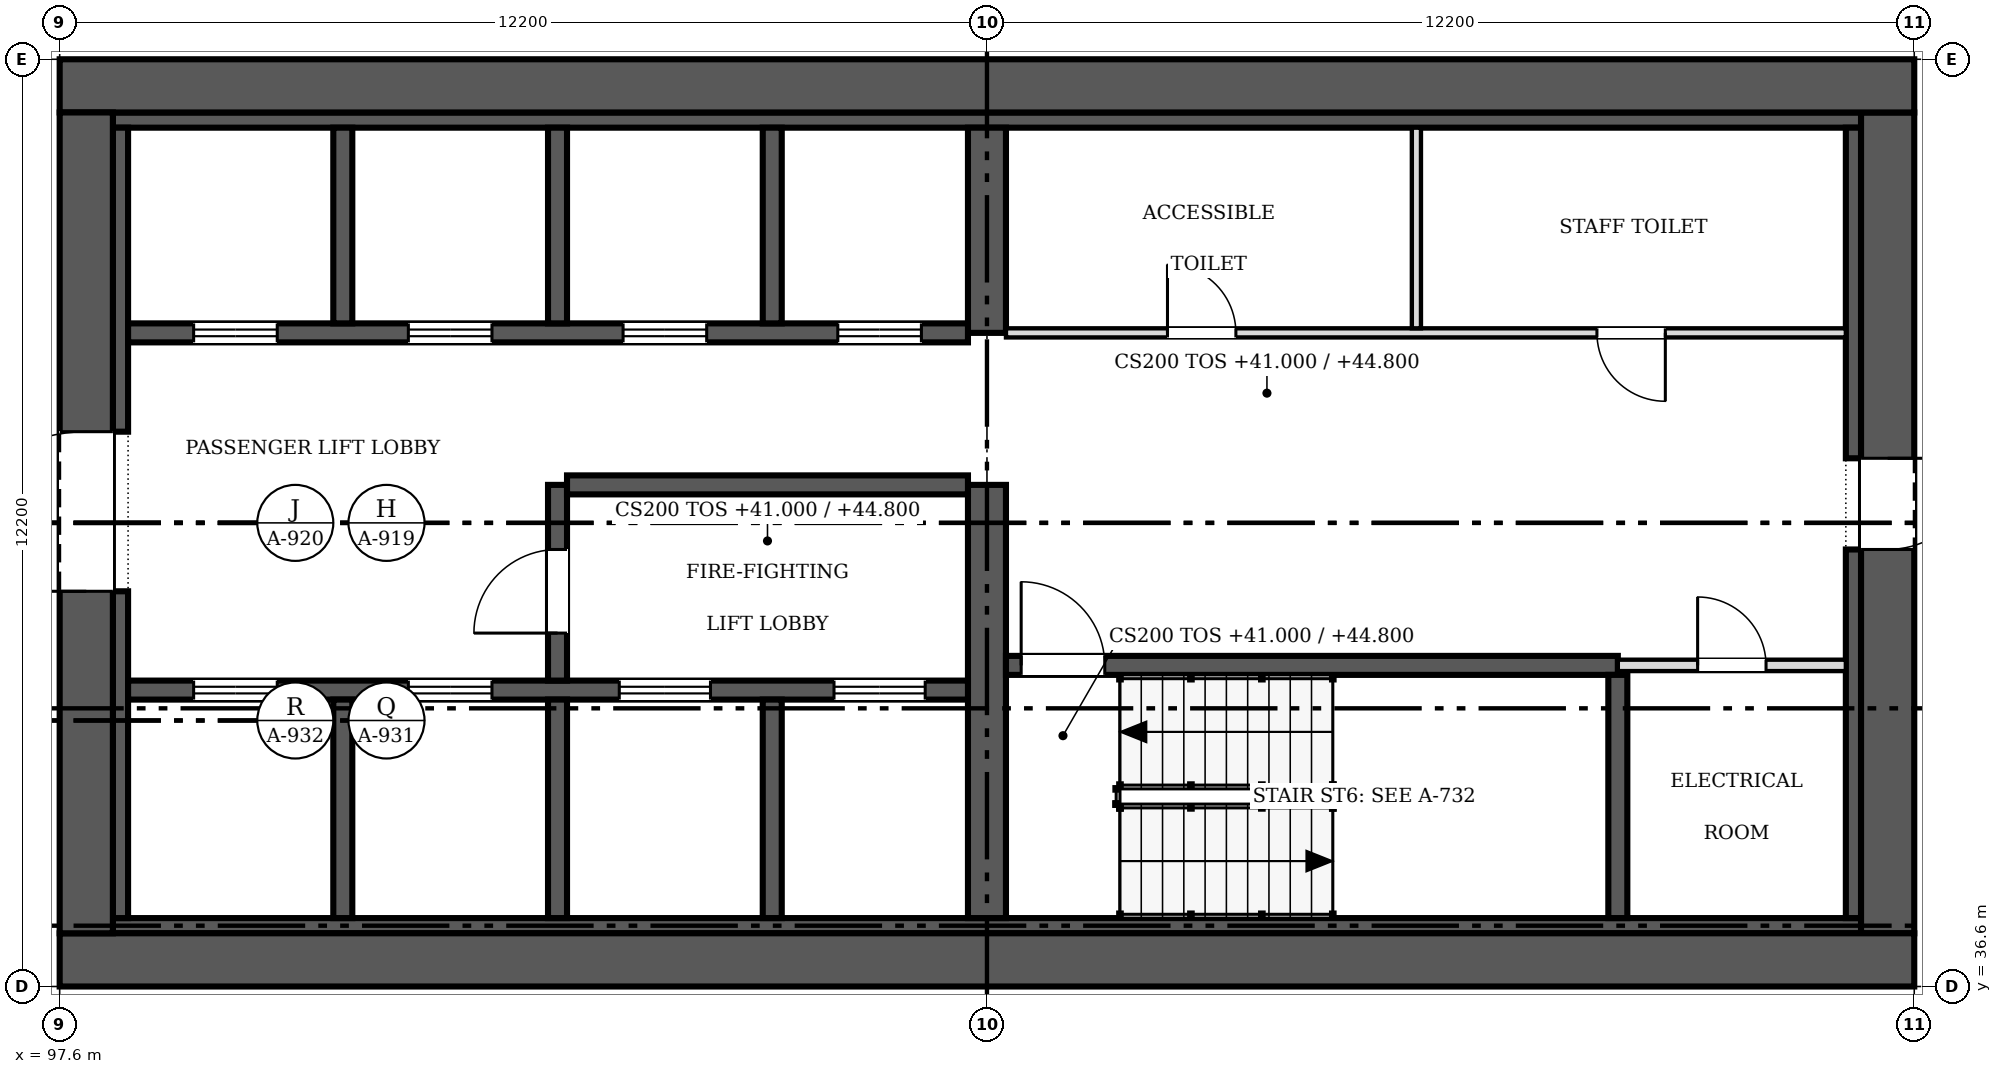
"""IFC4 building model, lengths in metres.
Left out: names, types, materials, properties, quantities, classifications, styles, units other than length and angle.
Written with IfcOpenShell. Run it as: python <this file> out.ifc"""

import sys

from ifc_helpers import new_model, si_unit, direction, frame, frame_2d, origin, place, context, subcontext, project, spatial, rectangle, extrude, source, transform, mapped, element, fill, save


model = new_model("IFC4")
c1 = context("Model", 3, precision=1e-05, world=origin(), true_north=direction((0.0, 1.0)))
c2 = subcontext(c1, "Body", "Model", "MODEL_VIEW")
j1 = project(units=[si_unit("LENGTHUNIT", "METRE"), si_unit("PLANEANGLEUNIT", "RADIAN")], contexts=[c1])
p1 = place(None, origin())
s1 = spatial("IfcSite", under=j1, at=p1, CompositionType="ELEMENT")
p2 = place(p1, origin())
s2 = spatial("IfcBuilding", under=s1, at=p2, CompositionType="ELEMENT")
p3 = place(p2, frame((0.0, 0.0, 41.0)))
s3 = spatial("IfcBuildingStorey", under=s2, at=p3, CompositionType="ELEMENT", Elevation=41.0)
p4 = place(p3, frame((122.0, 36.95, 0.0), z_axis=(0.0, 0.0, 1.0), x_axis=(-1.0, 0.0, 0.0)))
e1 = element("IfcWall", 1, at=p4, inside=s3, PredefinedType="SHEAR", context=c2, shape_type="SweptSolid", body=[
    extrude(rectangle(XDim=24.4, YDim=0.7, at=frame_2d((12.2, 0.0))), origin(), (0.0, 0.0, 1.0), 3.8),
])
p5 = place(p3, frame((97.95, 37.3, 0.0), z_axis=(0.0, 0.0, 1.0), x_axis=(0.0, 1.0, 0.0)))
e2 = element("IfcWall", 2, at=p5, inside=s3, PredefinedType="SHEAR", context=c2, shape_type="SweptSolid", body=[
    extrude(rectangle(XDim=10.8, YDim=0.7, at=frame_2d((5.4, 0.0))), origin(), (0.0, 0.0, 1.0), 3.8),
])
m1 = source(origin(), c2, "Body", "SweptSolid", [
    extrude(rectangle(XDim=2.1, YDim=2.4, at=frame_2d((1.05, 1.2))), frame((0.0, 0.36, 0.0), z_axis=(0.0, -1.0, 0.0), x_axis=(1.0, 0.0, 0.0)), (0.0, 0.0, 1.0), 0.72),
])
p6 = place(p5, frame((4.5, 0.0, 0.0)))
e3 = element("IfcOpeningElement", 3, at=p6, cuts=e2, PredefinedType="OPENING", context=c2, shape_type="MappedRepresentation", body=[
    mapped(m1, transform((0.0, 0.0, 0.0), scale=1.0)),
])
p7 = place(p3, frame((97.6, 48.45, 0.0), z_axis=(0.0, 0.0, 1.0), x_axis=(1.0, 0.0, 0.0)))
e4 = element("IfcWall", 4, at=p7, inside=s3, PredefinedType="SHEAR", context=c2, shape_type="SweptSolid", body=[
    extrude(rectangle(XDim=24.4, YDim=0.7, at=frame_2d((12.2, 0.0))), origin(), (0.0, 0.0, 1.0), 3.8),
])
p8 = place(p3, frame((121.65, 48.1, 0.0), z_axis=(0.0, 0.0, 1.0), x_axis=(0.0, -1.0, 0.0)))
e5 = element("IfcWall", 5, at=p8, inside=s3, PredefinedType="SHEAR", context=c2, shape_type="SweptSolid", body=[
    extrude(rectangle(XDim=10.8, YDim=0.7, at=frame_2d((5.4, 0.0))), origin(), (0.0, 0.0, 1.0), 3.8),
])
m2 = source(origin(), c2, "Body", "SweptSolid", [
    extrude(rectangle(XDim=1.2, YDim=2.1, at=frame_2d((0.6, 1.05))), frame((0.0, 0.36, 0.0), z_axis=(0.0, -1.0, 0.0), x_axis=(1.0, 0.0, 0.0)), (0.0, 0.0, 1.0), 0.72),
])
p9 = place(p8, frame((4.55, 0.0, 0.0)))
e6 = element("IfcOpeningElement", 6, at=p9, cuts=e5, PredefinedType="OPENING", context=c2, shape_type="MappedRepresentation", body=[
    mapped(m2, transform((0.0, 0.0, 0.0), scale=1.0)),
])
for number, where, z_axis, x_axis in (
    (7, (98.3, 37.4, 0.0), (0.0, 0.0, 1.0), (1.0, 0.0, 0.0)),
    (8, (98.3, 48.0, 0.0), (0.0, 0.0, 1.0), (1.0, 0.0, 0.0)),
):
    element("IfcWall", number, at=place(p3, frame(where, z_axis=z_axis, x_axis=x_axis)), inside=s3, PredefinedType="SOLIDWALL", context=c2, shape_type="SweptSolid", body=[
        extrude(rectangle(XDim=23.0, YDim=0.2, at=frame_2d((11.5, 0.0))), origin(), (0.0, 0.0, 1.0), 3.8),
    ])
p10 = place(p3, frame((98.4, 37.5, 0.0), z_axis=(0.0, 0.0, 1.0), x_axis=(0.0, 1.0, 0.0)))
e9 = element("IfcWall", 9, at=p10, inside=s3, PredefinedType="SOLIDWALL", context=c2, shape_type="SweptSolid", body=[
    extrude(rectangle(XDim=4.3, YDim=0.2, at=frame_2d((2.15, 0.0))), origin(), (0.0, 0.0, 1.0), 3.8),
])
p11 = place(p3, frame((98.4, 43.9, 0.0), z_axis=(0.0, 0.0, 1.0), x_axis=(0.0, 1.0, 0.0)))
e10 = element("IfcWall", 10, at=p11, inside=s3, PredefinedType="SOLIDWALL", context=c2, shape_type="SweptSolid", body=[
    extrude(rectangle(XDim=4.0, YDim=0.2, at=frame_2d((2.0, 0.0))), origin(), (0.0, 0.0, 1.0), 3.8),
])
p12 = place(p3, frame((121.2, 37.5, 0.0), z_axis=(0.0, 0.0, 1.0), x_axis=(0.0, 1.0, 0.0)))
e11 = element("IfcWall", 11, at=p12, inside=s3, PredefinedType="SOLIDWALL", context=c2, shape_type="SweptSolid", body=[
    extrude(rectangle(XDim=4.85, YDim=0.2, at=frame_2d((2.425, 0.0))), origin(), (0.0, 0.0, 1.0), 3.8),
])
p13 = place(p3, frame((121.2, 43.55, 0.0), z_axis=(0.0, 0.0, 1.0), x_axis=(0.0, 1.0, 0.0)))
e12 = element("IfcWall", 12, at=p13, inside=s3, PredefinedType="SOLIDWALL", context=c2, shape_type="SweptSolid", body=[
    extrude(rectangle(XDim=4.35, YDim=0.2, at=frame_2d((2.175, 0.0))), origin(), (0.0, 0.0, 1.0), 3.8),
])
p14 = place(p3, frame((109.8, 37.5, 0.0), z_axis=(0.0, 0.0, 1.0), x_axis=(0.0, 1.0, 0.0)))
e13 = element("IfcWall", 13, at=p14, inside=s3, PredefinedType="SHEAR", context=c2, shape_type="SweptSolid", body=[
    extrude(rectangle(XDim=5.7, YDim=0.5, at=frame_2d((2.85, 0.0))), origin(), (0.0, 0.0, 1.0), 3.8),
])
p15 = place(p3, frame((109.8, 45.2, 0.0), z_axis=(0.0, 0.0, 1.0), x_axis=(0.0, 1.0, 0.0)))
e14 = element("IfcWall", 14, at=p15, inside=s3, PredefinedType="SHEAR", context=c2, shape_type="SweptSolid", body=[
    extrude(rectangle(XDim=2.7, YDim=0.5, at=frame_2d((1.35, 0.0))), origin(), (0.0, 0.0, 1.0), 3.8),
])
p16 = place(p3, frame((98.5, 40.5, 0.0), z_axis=(0.0, 0.0, 1.0), x_axis=(1.0, 0.0, 0.0)))
e15 = element("IfcWall", 15, at=p16, inside=s3, PredefinedType="SOLIDWALL", context=c2, shape_type="SweptSolid", body=[
    extrude(rectangle(XDim=11.05, YDim=0.25, at=frame_2d((5.525, 0.0))), origin(), (0.0, 0.0, 1.0), 3.8),
])
m3 = source(origin(), c2, "Body", "SweptSolid", [
    extrude(rectangle(XDim=1.1, YDim=2.1, at=frame_2d((0.55, 1.05))), frame((0.0, 0.135, 0.0), z_axis=(0.0, -1.0, 0.0), x_axis=(1.0, 0.0, 0.0)), (0.0, 0.0, 1.0), 0.27),
])
p17 = place(p16, frame((0.863, 0.0, 0.0)))
e16 = element("IfcOpeningElement", 16, at=p17, cuts=e15, PredefinedType="OPENING", context=c2, shape_type="MappedRepresentation", body=[
    mapped(m3, transform((0.0, 0.0, 0.0), scale=1.0)),
])
p18 = place(p16, frame((3.688, 0.0, 0.0)))
e17 = element("IfcOpeningElement", 17, at=p18, cuts=e15, PredefinedType="OPENING", context=c2, shape_type="MappedRepresentation", body=[
    mapped(m3, transform((0.0, 0.0, 0.0), scale=1.0)),
])
m4 = source(origin(), c2, "Body", "SweptSolid", [
    extrude(rectangle(XDim=1.2, YDim=2.1, at=frame_2d((0.6, 1.05))), frame((0.0, 0.135, 0.0), z_axis=(0.0, -1.0, 0.0), x_axis=(1.0, 0.0, 0.0)), (0.0, 0.0, 1.0), 0.27),
])
p19 = place(p16, frame((6.462, 0.0, 0.0)))
e18 = element("IfcOpeningElement", 18, at=p19, cuts=e15, PredefinedType="OPENING", context=c2, shape_type="MappedRepresentation", body=[
    mapped(m4, transform((0.0, 0.0, 0.0), scale=1.0)),
])
p20 = place(p16, frame((9.288, 0.0, 0.0)))
e19 = element("IfcOpeningElement", 19, at=p20, cuts=e15, PredefinedType="OPENING", context=c2, shape_type="MappedRepresentation", body=[
    mapped(m4, transform((0.0, 0.0, 0.0), scale=1.0)),
])
p21 = place(p3, frame((109.55, 45.2, 0.0), z_axis=(0.0, 0.0, 1.0), x_axis=(-1.0, 0.0, 0.0)))
e20 = element("IfcWall", 20, at=p21, inside=s3, PredefinedType="SOLIDWALL", context=c2, shape_type="SweptSolid", body=[
    extrude(rectangle(XDim=11.05, YDim=0.25, at=frame_2d((5.525, 0.0))), origin(), (0.0, 0.0, 1.0), 3.8),
])
p22 = place(p21, frame((9.087, 0.0, 0.0)))
e21 = element("IfcOpeningElement", 21, at=p22, cuts=e20, PredefinedType="OPENING", context=c2, shape_type="MappedRepresentation", body=[
    mapped(m3, transform((0.0, 0.0, 0.0), scale=1.0)),
])
p23 = place(p21, frame((6.262, 0.0, 0.0)))
e22 = element("IfcOpeningElement", 22, at=p23, cuts=e20, PredefinedType="OPENING", context=c2, shape_type="MappedRepresentation", body=[
    mapped(m3, transform((0.0, 0.0, 0.0), scale=1.0)),
])
p24 = place(p21, frame((3.438, 0.0, 0.0)))
e23 = element("IfcOpeningElement", 23, at=p24, cuts=e20, PredefinedType="OPENING", context=c2, shape_type="MappedRepresentation", body=[
    mapped(m3, transform((0.0, 0.0, 0.0), scale=1.0)),
])
p25 = place(p21, frame((0.613, 0.0, 0.0)))
e24 = element("IfcOpeningElement", 24, at=p25, cuts=e20, PredefinedType="OPENING", context=c2, shape_type="MappedRepresentation", body=[
    mapped(m3, transform((0.0, 0.0, 0.0), scale=1.0)),
])
p26 = place(p3, frame((118.1, 40.825, 0.0), z_axis=(0.0, 0.0, 1.0), x_axis=(-1.0, 0.0, 0.0)))
e25 = element("IfcWall", 25, at=p26, inside=s3, PredefinedType="SOLIDWALL", context=c2, shape_type="SweptSolid", body=[
    extrude(rectangle(XDim=8.05, YDim=0.25, at=frame_2d((4.025, 0.0))), origin(), (0.0, 0.0, 1.0), 3.8),
])
p27 = place(p26, frame((6.75, 0.0, 0.0)))
e26 = element("IfcOpeningElement", 26, at=p27, cuts=e25, PredefinedType="OPENING", context=c2, shape_type="MappedRepresentation", body=[
    mapped(m3, transform((0.0, 0.0, 0.0), scale=1.0)),
])
p28 = place(p3, frame((104.15, 37.5, 0.0), z_axis=(0.0, 0.0, 1.0), x_axis=(0.0, 1.0, 0.0)))
e27 = element("IfcWall", 27, at=p28, inside=s3, PredefinedType="SOLIDWALL", context=c2, shape_type="SweptSolid", body=[
    extrude(rectangle(XDim=2.875, YDim=0.25, at=frame_2d((1.438, 0.0))), origin(), (0.0, 0.0, 1.0), 3.8),
])
p29 = place(p3, frame((104.15, 43.2, 0.0), z_axis=(0.0, 0.0, 1.0), x_axis=(0.0, -1.0, 0.0)))
e28 = element("IfcWall", 28, at=p29, inside=s3, PredefinedType="SOLIDWALL", context=c2, shape_type="SweptSolid", body=[
    extrude(rectangle(XDim=2.575, YDim=0.25, at=frame_2d((1.288, 0.0))), origin(), (0.0, 0.0, 1.0), 3.8),
])
p30 = place(p29, frame((0.85, 0.0, 0.0)))
e29 = element("IfcOpeningElement", 29, at=p30, cuts=e28, PredefinedType="OPENING", context=c2, shape_type="MappedRepresentation", body=[
    mapped(m3, transform((0.0, 0.0, 0.0), scale=1.0)),
])
p31 = place(p3, frame((104.275, 43.2, 0.0), z_axis=(0.0, 0.0, 1.0), x_axis=(1.0, 0.0, 0.0)))
e30 = element("IfcWall", 30, at=p31, inside=s3, PredefinedType="SOLIDWALL", context=c2, shape_type="SweptSolid", body=[
    extrude(rectangle(XDim=5.275, YDim=0.25, at=frame_2d((2.638, 0.0))), origin(), (0.0, 0.0, 1.0), 3.8),
])
p32 = place(p3, frame((118.1, 37.5, 0.0), z_axis=(0.0, 0.0, 1.0), x_axis=(0.0, 1.0, 0.0)))
e31 = element("IfcWall", 31, at=p32, inside=s3, PredefinedType="SOLIDWALL", context=c2, shape_type="SweptSolid", body=[
    extrude(rectangle(XDim=3.2, YDim=0.25, at=frame_2d((1.6, 0.0))), origin(), (0.0, 0.0, 1.0), 3.8),
])
for number, where, z_axis, x_axis in (
    (32, (101.325, 37.5, 0.0), (0.0, 0.0, 1.0), (0.0, 1.0, 0.0)),
    (33, (106.975, 37.5, 0.0), (0.0, 0.0, 1.0), (0.0, 1.0, 0.0)),
):
    element("IfcWall", number, at=place(p3, frame(where, z_axis=z_axis, x_axis=x_axis)), inside=s3, PredefinedType="SOLIDWALL", context=c2, shape_type="SweptSolid", body=[
        extrude(rectangle(XDim=2.875, YDim=0.25, at=frame_2d((1.438, 0.0))), origin(), (0.0, 0.0, 1.0), 3.8),
    ])
for number, where, z_axis, x_axis in (
    (34, (101.325, 45.325, 0.0), (0.0, 0.0, 1.0), (0.0, 1.0, 0.0)),
    (35, (104.15, 45.325, 0.0), (0.0, 0.0, 1.0), (0.0, 1.0, 0.0)),
    (36, (106.975, 45.325, 0.0), (0.0, 0.0, 1.0), (0.0, 1.0, 0.0)),
):
    element("IfcWall", number, at=place(p3, frame(where, z_axis=z_axis, x_axis=x_axis)), inside=s3, PredefinedType="SOLIDWALL", context=c2, shape_type="SweptSolid", body=[
        extrude(rectangle(XDim=2.575, YDim=0.25, at=frame_2d((1.288, 0.0))), origin(), (0.0, 0.0, 1.0), 3.8),
    ])
p33 = place(p3, frame((110.05, 45.2, 0.0), z_axis=(0.0, 0.0, 1.0), x_axis=(1.0, 0.0, 0.0)))
e37 = element("IfcWall", 37, at=p33, inside=s3, PredefinedType="PARTITIONING", context=c2, shape_type="SweptSolid", body=[
    extrude(rectangle(XDim=11.05, YDim=0.12, at=frame_2d((5.525, 0.0))), origin(), (0.0, 0.0, 1.0), 3.6),
])
m5 = source(origin(), c2, "Body", "SweptSolid", [
    extrude(rectangle(XDim=0.9, YDim=2.1, at=frame_2d((0.45, 1.05))), frame((0.0, 0.07, 0.0), z_axis=(0.0, -1.0, 0.0), x_axis=(1.0, 0.0, 0.0)), (0.0, 0.0, 1.0), 0.14),
])
p34 = place(p33, frame((2.125, 0.0, 0.0)))
e38 = element("IfcOpeningElement", 38, at=p34, cuts=e37, PredefinedType="OPENING", context=c2, shape_type="MappedRepresentation", body=[
    mapped(m5, transform((0.0, 0.0, 0.0), scale=1.0)),
])
p35 = place(p33, frame((7.775, 0.0, 0.0)))
e39 = element("IfcOpeningElement", 39, at=p35, cuts=e37, PredefinedType="OPENING", context=c2, shape_type="MappedRepresentation", body=[
    mapped(m5, transform((0.0, 0.0, 0.0), scale=1.0)),
])
p36 = place(p3, frame((121.1, 40.825, 0.0), z_axis=(0.0, 0.0, 1.0), x_axis=(-1.0, 0.0, 0.0)))
e40 = element("IfcWall", 40, at=p36, inside=s3, PredefinedType="PARTITIONING", context=c2, shape_type="SweptSolid", body=[
    extrude(rectangle(XDim=3.0, YDim=0.15, at=frame_2d((1.5, 0.0))), origin(), (0.0, 0.0, 1.0), 3.6),
])
m6 = source(origin(), c2, "Body", "SweptSolid", [
    extrude(rectangle(XDim=0.9, YDim=2.1, at=frame_2d((0.45, 1.05))), frame((0.0, 0.085, 0.0), z_axis=(0.0, -1.0, 0.0), x_axis=(1.0, 0.0, 0.0)), (0.0, 0.0, 1.0), 0.17),
])
p37 = place(p36, frame((1.05, 0.0, 0.0)))
e41 = element("IfcOpeningElement", 41, at=p37, cuts=e40, PredefinedType="OPENING", context=c2, shape_type="MappedRepresentation", body=[
    mapped(m6, transform((0.0, 0.0, 0.0), scale=1.0)),
])
p38 = place(p3, frame((115.45, 45.26, 0.0), z_axis=(0.0, 0.0, 1.0), x_axis=(0.0, 1.0, 0.0)))
e42 = element("IfcWall", 42, at=p38, inside=s3, PredefinedType="PARTITIONING", context=c2, shape_type="SweptSolid", body=[
    extrude(rectangle(XDim=2.64, YDim=0.12, at=frame_2d((1.32, 0.0))), origin(), (0.0, 0.0, 1.0), 3.6),
])
m7 = source(origin(), c2, "Body", "SweptSolid", [
    extrude(rectangle(XDim=2.1, YDim=2.4, at=frame_2d((1.05, 1.2))), frame((0.0, 0.025, 0.0), z_axis=(0.0, -1.0, 0.0), x_axis=(1.0, 0.0, 0.0)), (0.0, 0.0, 1.0), 0.05),
])
p39 = place(p6, origin())
e43 = element("IfcDoor", 43, at=p39, inside=s3, OperationType="DOUBLE_DOOR_SINGLE_SWING", PredefinedType="DOOR", context=c2, shape_type="MappedRepresentation", body=[
    mapped(m7, transform((0.0, 0.0, 0.0), scale=1.0)),
])
fill(e3, e43)
m8 = source(origin(), c2, "Body", "SweptSolid", [
    extrude(rectangle(XDim=1.2, YDim=2.1, at=frame_2d((0.6, 1.05))), frame((0.0, 0.025, 0.0), z_axis=(0.0, -1.0, 0.0), x_axis=(1.0, 0.0, 0.0)), (0.0, 0.0, 1.0), 0.05),
])
p40 = place(p9, origin())
e44 = element("IfcDoor", 44, at=p40, inside=s3, OperationType="SINGLE_SWING_LEFT", PredefinedType="DOOR", context=c2, shape_type="MappedRepresentation", body=[
    mapped(m8, transform((0.0, 0.0, 0.0), scale=1.0)),
])
fill(e6, e44)
m9 = source(origin(), c2, "Body", "SweptSolid", [
    extrude(rectangle(XDim=1.1, YDim=2.1, at=frame_2d((0.55, 1.05))), frame((0.0, 0.025, 0.0), z_axis=(0.0, -1.0, 0.0), x_axis=(1.0, 0.0, 0.0)), (0.0, 0.0, 1.0), 0.05),
])
p41 = place(p17, origin())
e45 = element("IfcDoor", 45, at=p41, inside=s3, OperationType="DOUBLE_DOOR_SLIDING", PredefinedType="DOOR", context=c2, shape_type="MappedRepresentation", body=[
    mapped(m9, transform((0.0, 0.0, 0.0), scale=1.0)),
])
fill(e16, e45)
p42 = place(p18, origin())
e46 = element("IfcDoor", 46, at=p42, inside=s3, OperationType="DOUBLE_DOOR_SLIDING", PredefinedType="DOOR", context=c2, shape_type="MappedRepresentation", body=[
    mapped(m9, transform((0.0, 0.0, 0.0), scale=1.0)),
])
fill(e17, e46)
p43 = place(p19, origin())
e47 = element("IfcDoor", 47, at=p43, inside=s3, OperationType="DOUBLE_DOOR_SLIDING", PredefinedType="DOOR", context=c2, shape_type="MappedRepresentation", body=[
    mapped(m8, transform((0.0, 0.0, 0.0), scale=1.0)),
])
fill(e18, e47)
p44 = place(p20, origin())
e48 = element("IfcDoor", 48, at=p44, inside=s3, OperationType="DOUBLE_DOOR_SLIDING", PredefinedType="DOOR", context=c2, shape_type="MappedRepresentation", body=[
    mapped(m8, transform((0.0, 0.0, 0.0), scale=1.0)),
])
fill(e19, e48)
p45 = place(p22, origin())
e49 = element("IfcDoor", 49, at=p45, inside=s3, OperationType="DOUBLE_DOOR_SLIDING", PredefinedType="DOOR", context=c2, shape_type="MappedRepresentation", body=[
    mapped(m9, transform((0.0, 0.0, 0.0), scale=1.0)),
])
fill(e21, e49)
p46 = place(p23, origin())
e50 = element("IfcDoor", 50, at=p46, inside=s3, OperationType="DOUBLE_DOOR_SLIDING", PredefinedType="DOOR", context=c2, shape_type="MappedRepresentation", body=[
    mapped(m9, transform((0.0, 0.0, 0.0), scale=1.0)),
])
fill(e22, e50)
p47 = place(p24, origin())
e51 = element("IfcDoor", 51, at=p47, inside=s3, OperationType="DOUBLE_DOOR_SLIDING", PredefinedType="DOOR", context=c2, shape_type="MappedRepresentation", body=[
    mapped(m9, transform((0.0, 0.0, 0.0), scale=1.0)),
])
fill(e23, e51)
p48 = place(p25, origin())
e52 = element("IfcDoor", 52, at=p48, inside=s3, OperationType="DOUBLE_DOOR_SLIDING", PredefinedType="DOOR", context=c2, shape_type="MappedRepresentation", body=[
    mapped(m9, transform((0.0, 0.0, 0.0), scale=1.0)),
])
fill(e24, e52)
p49 = place(p27, origin())
e53 = element("IfcDoor", 53, at=p49, inside=s3, OperationType="SINGLE_SWING_RIGHT", PredefinedType="DOOR", context=c2, shape_type="MappedRepresentation", body=[
    mapped(m9, transform((0.0, 0.0, 0.0), scale=1.0)),
])
fill(e26, e53)
p50 = place(p30, origin())
e54 = element("IfcDoor", 54, at=p50, inside=s3, OperationType="SINGLE_SWING_RIGHT", PredefinedType="DOOR", context=c2, shape_type="MappedRepresentation", body=[
    mapped(m9, transform((0.0, 0.0, 0.0), scale=1.0)),
])
fill(e29, e54)
m10 = source(origin(), c2, "Body", "SweptSolid", [
    extrude(rectangle(XDim=0.9, YDim=2.1, at=frame_2d((0.45, 1.05))), frame((0.0, 0.025, 0.0), z_axis=(0.0, -1.0, 0.0), x_axis=(1.0, 0.0, 0.0)), (0.0, 0.0, 1.0), 0.05),
])
p51 = place(p34, origin())
e55 = element("IfcDoor", 55, at=p51, inside=s3, OperationType="SINGLE_SWING_LEFT", PredefinedType="DOOR", context=c2, shape_type="MappedRepresentation", body=[
    mapped(m10, transform((0.0, 0.0, 0.0), scale=1.0)),
])
fill(e38, e55)
p52 = place(p35, origin())
e56 = element("IfcDoor", 56, at=p52, inside=s3, OperationType="SINGLE_SWING_RIGHT", PredefinedType="DOOR", context=c2, shape_type="MappedRepresentation", body=[
    mapped(m10, transform((0.0, 0.0, 0.0), scale=1.0)),
])
fill(e39, e56)
p53 = place(p37, origin())
e57 = element("IfcDoor", 57, at=p53, inside=s3, OperationType="SINGLE_SWING_RIGHT", PredefinedType="DOOR", context=c2, shape_type="MappedRepresentation", body=[
    mapped(m10, transform((0.0, 0.0, 0.0), scale=1.0)),
])
fill(e41, e57)
save(model, sys.argv[1])
